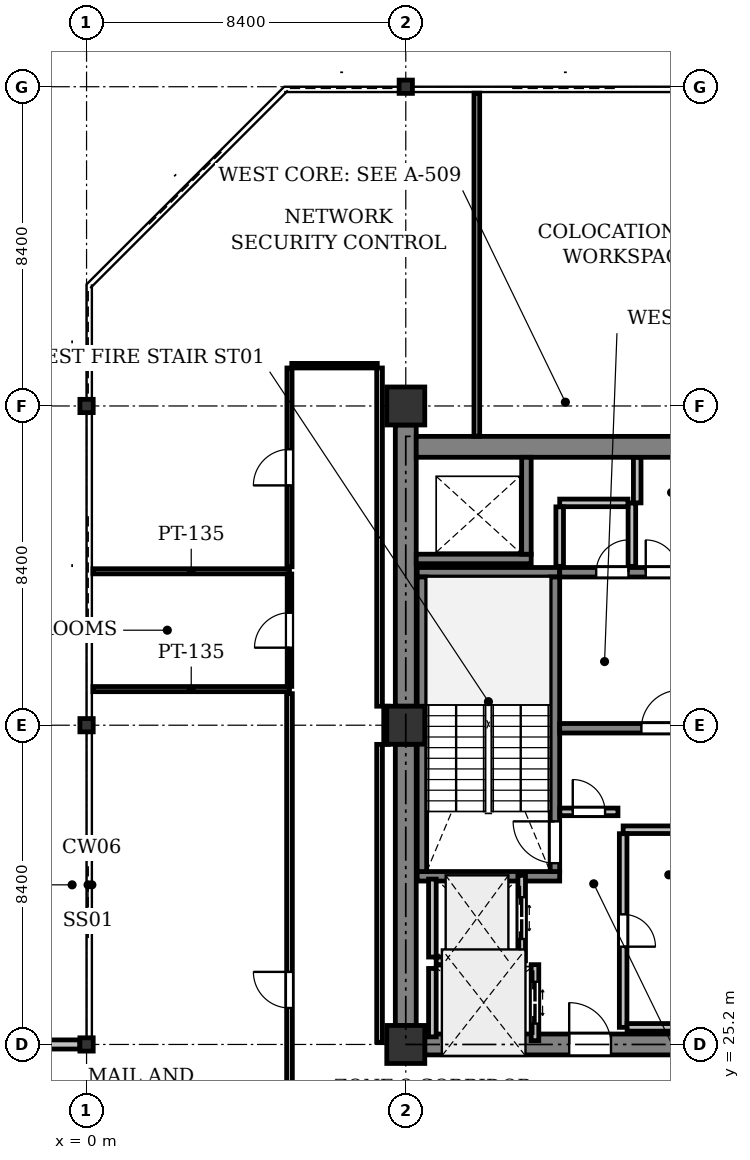
"""IFC4 building model, lengths in metres.
Left out: names, types, materials, properties, quantities, classifications, styles, units other than length and angle.
Written with IfcOpenShell. Run it as: python <this file> out.ifc"""

import sys

from ifc_helpers import new_model, si_unit, direction, frame, frame_2d, origin, origin_2d, place, context, subcontext, project, spatial, rectangle, i_section, extrude, element, fill, save


model = new_model("IFC4")
c1 = context("Model", 3, precision=1e-05, world=origin(), true_north=direction((0.0, 1.0)))
c2 = subcontext(c1, "Body", "Model", "MODEL_VIEW")
j1 = project(units=[si_unit("LENGTHUNIT", "METRE"), si_unit("PLANEANGLEUNIT", "RADIAN")], contexts=[c1])
p1 = place(None, origin())
s1 = spatial("IfcSite", under=j1, at=p1, CompositionType="ELEMENT")
p2 = place(p1, origin())
s2 = spatial("IfcBuilding", under=s1, at=p2, CompositionType="ELEMENT")
p3 = place(p2, frame((0.0, 0.0, 171.4)))
s3 = spatial("IfcBuildingStorey", under=s2, at=p3, CompositionType="ELEMENT", Elevation=171.4)
for number, where, z_axis, x_axis in (
    (1, (0.0, 25.2, 0.0), (0.0, 0.0, 1.0), (1.0, 0.0, 0.0)),
    (2, (0.0, 33.6, 0.0), (0.0, 0.0, 1.0), (1.0, 0.0, 0.0)),
    (3, (0.0, 42.0, 0.0), (0.0, 0.0, 1.0), (1.0, 0.0, 0.0)),
):
    element("IfcColumn", number, at=place(p3, frame(where, z_axis=z_axis, x_axis=x_axis)), inside=s3, PredefinedType="COLUMN", context=c2, shape_type="SweptSolid", body=[
        extrude(i_section(OverallWidth=0.35, OverallDepth=0.35, WebThickness=0.02, FlangeThickness=0.032, at=origin_2d()), origin(), (0.0, 0.0, 1.0), 4.1),
    ])
for number, where, z_axis, x_axis in (
    (4, (8.4, 25.2, 0.0), (0.0, 0.0, 1.0), (1.0, 0.0, 0.0)),
    (5, (8.4, 33.6, 0.0), (0.0, 0.0, 1.0), (1.0, 0.0, 0.0)),
    (6, (8.4, 42.0, 0.0), (0.0, 0.0, 1.0), (1.0, 0.0, 0.0)),
):
    element("IfcColumn", number, at=place(p3, frame(where, z_axis=z_axis, x_axis=x_axis)), inside=s3, PredefinedType="COLUMN", context=c2, shape_type="SweptSolid", body=[
        extrude(rectangle(XDim=1.0, YDim=1.0, at=origin_2d()), origin(), (0.0, 0.0, 1.0), 4.1),
    ])
p4 = place(p3, frame((8.4, 50.4, 0.0), z_axis=(0.0, 0.0, 1.0), x_axis=(1.0, 0.0, 0.0)))
e7 = element("IfcColumn", 7, at=p4, inside=s3, PredefinedType="COLUMN", context=c2, shape_type="SweptSolid", body=[
    extrude(i_section(OverallWidth=0.35, OverallDepth=0.35, WebThickness=0.02, FlangeThickness=0.032, at=origin_2d()), origin(), (0.0, 0.0, 1.0), 4.1),
])
p5 = place(p3, frame((-7.344, 25.2, 0.0), z_axis=(0.0, 0.0, 1.0), x_axis=(1.0, 0.0, 0.0)))
e8 = element("IfcWall", 8, at=p5, inside=s3, PredefinedType="STANDARD", context=c2, shape_type="SweptSolid", body=[
    extrude(rectangle(XDim=7.169, YDim=0.24, at=frame_2d((3.585, 0.0))), origin(), (0.0, 0.0, 1.0), 2.915),
])
p6 = place(p3, frame((8.4, 25.7, 0.0), z_axis=(0.0, 0.0, 1.0), x_axis=(0.0, 1.0, 0.0)))
e9 = element("IfcWall", 9, at=p6, inside=s3, PredefinedType="SHEAR", context=c2, shape_type="SweptSolid", body=[
    extrude(rectangle(XDim=7.4, YDim=0.55, at=frame_2d((3.7, 0.0))), origin(), (0.0, 0.0, 1.0), 3.825),
])
p7 = place(p3, frame((8.4, 34.1, 0.0), z_axis=(0.0, 0.0, 1.0), x_axis=(0.0, 1.0, 0.0)))
e10 = element("IfcWall", 10, at=p7, inside=s3, PredefinedType="SHEAR", context=c2, shape_type="SweptSolid", body=[
    extrude(rectangle(XDim=7.4, YDim=0.55, at=frame_2d((3.7, 0.0))), origin(), (0.0, 0.0, 1.0), 3.825),
])
p8 = place(p3, frame((8.675, 40.925, 0.0), z_axis=(0.0, 0.0, 1.0), x_axis=(1.0, 0.0, 0.0)))
e11 = element("IfcWall", 11, at=p8, inside=s3, PredefinedType="SHEAR", context=c2, shape_type="SweptSolid", body=[
    extrude(rectangle(XDim=7.85, YDim=0.55, at=frame_2d((3.925, 0.0))), origin(), (0.0, 0.0, 1.0), 3.825),
])
p9 = place(p3, frame((8.9, 25.2, 0.0), z_axis=(0.0, 0.0, 1.0), x_axis=(1.0, 0.0, 0.0)))
e12 = element("IfcWall", 12, at=p9, inside=s3, PredefinedType="SHEAR", context=c2, shape_type="SweptSolid", body=[
    extrude(rectangle(XDim=7.4, YDim=0.55, at=frame_2d((3.7, 0.0))), origin(), (0.0, 0.0, 1.0), 3.825),
])
p10 = place(p9, frame((3.8, 0.0, 0.0)))
e13 = element("IfcOpeningElement", 13, at=p10, cuts=e12, PredefinedType="OPENING", context=c2, shape_type="SweptSolid", body=[
    extrude(rectangle(XDim=1.1, YDim=2.15, at=frame_2d((0.55, 1.075))), frame((0.0, 0.285, 0.0), z_axis=(0.0, -1.0, 0.0), x_axis=(1.0, 0.0, 0.0)), (0.0, 0.0, 1.0), 0.57),
])
for number, where, z_axis, x_axis in (
    (14, (12.45, 29.625, 0.0), (0.0, 0.0, 1.0), (-1.0, 0.0, 0.0)),
    (15, (12.45, 37.625, 0.0), (0.0, 0.0, 1.0), (-1.0, 0.0, 0.0)),
):
    element("IfcWall", number, at=place(p3, frame(where, z_axis=z_axis, x_axis=x_axis)), inside=s3, PredefinedType="SHEAR", context=c2, shape_type="SweptSolid", body=[
        extrude(rectangle(XDim=3.75, YDim=0.25, at=frame_2d((1.875, 0.0))), origin(), (0.0, 0.0, 1.0), 3.825),
    ])
p11 = place(p3, frame((12.325, 29.75, 0.0), z_axis=(0.0, 0.0, 1.0), x_axis=(0.0, 1.0, 0.0)))
e16 = element("IfcWall", 16, at=p11, inside=s3, PredefinedType="SHEAR", context=c2, shape_type="SweptSolid", body=[
    extrude(rectangle(XDim=7.75, YDim=0.25, at=frame_2d((3.875, 0.0))), origin(), (0.0, 0.0, 1.0), 3.825),
])
p12 = place(p11, frame((0.22, 0.0, 0.0)))
e17 = element("IfcOpeningElement", 17, at=p12, cuts=e16, PredefinedType="OPENING", context=c2, shape_type="SweptSolid", body=[
    extrude(rectangle(XDim=1.1, YDim=2.15, at=frame_2d((0.55, 1.075))), frame((0.0, 0.135, 0.0), z_axis=(0.0, -1.0, 0.0), x_axis=(1.0, 0.0, 0.0)), (0.0, 0.0, 1.0), 0.27),
])
p13 = place(p3, frame((8.825, 29.75, 0.0), z_axis=(0.0, 0.0, 1.0), x_axis=(0.0, 1.0, 0.0)))
e18 = element("IfcWall", 18, at=p13, inside=s3, PredefinedType="SHEAR", context=c2, shape_type="SweptSolid", body=[
    extrude(rectangle(XDim=7.75, YDim=0.25, at=frame_2d((3.875, 0.0))), origin(), (0.0, 0.0, 1.0), 3.825),
])
p14 = place(p3, frame((8.675, 37.975, 0.0), z_axis=(0.0, 0.0, 1.0), x_axis=(1.0, 0.0, 0.0)))
e19 = element("IfcWall", 19, at=p14, inside=s3, PredefinedType="SHEAR", context=c2, shape_type="SweptSolid", body=[
    extrude(rectangle(XDim=3.025, YDim=0.25, at=frame_2d((1.512, 0.0))), origin(), (0.0, 0.0, 1.0), 3.825),
])
p15 = place(p3, frame((11.575, 38.1, 0.0), z_axis=(0.0, 0.0, 1.0), x_axis=(0.0, 1.0, 0.0)))
e20 = element("IfcWall", 20, at=p15, inside=s3, PredefinedType="SHEAR", context=c2, shape_type="SweptSolid", body=[
    extrude(rectangle(XDim=2.55, YDim=0.25, at=frame_2d((1.275, 0.0))), origin(), (0.0, 0.0, 1.0), 3.825),
])
p16 = place(p3, frame((12.45, 33.52, 0.0), z_axis=(0.0, 0.0, 1.0), x_axis=(1.0, 0.0, 0.0)))
e21 = element("IfcWall", 21, at=p16, inside=s3, PredefinedType="SHEAR", context=c2, shape_type="SweptSolid", body=[
    extrude(rectangle(XDim=3.85, YDim=0.25, at=frame_2d((1.925, 0.0))), origin(), (0.0, 0.0, 1.0), 3.825),
])
p17 = place(p16, frame((2.15, 0.0, 0.0)))
e22 = element("IfcOpeningElement", 22, at=p17, cuts=e21, PredefinedType="OPENING", context=c2, shape_type="SweptSolid", body=[
    extrude(rectangle(XDim=1.0, YDim=2.15, at=frame_2d((0.5, 1.075))), frame((0.0, 0.135, 0.0), z_axis=(0.0, -1.0, 0.0), x_axis=(1.0, 0.0, 0.0)), (0.0, 0.0, 1.0), 0.27),
])
p18 = place(p3, frame((12.45, 37.625, 0.0), z_axis=(0.0, 0.0, 1.0), x_axis=(1.0, 0.0, 0.0)))
e23 = element("IfcWall", 23, at=p18, inside=s3, PredefinedType="SHEAR", context=c2, shape_type="SweptSolid", body=[
    extrude(rectangle(XDim=4.075, YDim=0.25, at=frame_2d((2.038, 0.0))), origin(), (0.0, 0.0, 1.0), 3.825),
])
p19 = place(p18, frame((0.96, 0.0, 0.0)))
e24 = element("IfcOpeningElement", 24, at=p19, cuts=e23, PredefinedType="OPENING", context=c2, shape_type="SweptSolid", body=[
    extrude(rectangle(XDim=0.85, YDim=2.15, at=frame_2d((0.425, 1.075))), frame((0.0, 0.135, 0.0), z_axis=(0.0, -1.0, 0.0), x_axis=(1.0, 0.0, 0.0)), (0.0, 0.0, 1.0), 0.27),
])
p20 = place(p18, frame((2.264, 0.0, 0.0)))
e25 = element("IfcOpeningElement", 25, at=p20, cuts=e23, PredefinedType="OPENING", context=c2, shape_type="SweptSolid", body=[
    extrude(rectangle(XDim=0.85, YDim=2.15, at=frame_2d((0.425, 1.075))), frame((0.0, 0.135, 0.0), z_axis=(0.0, -1.0, 0.0), x_axis=(1.0, 0.0, 0.0)), (0.0, 0.0, 1.0), 0.27),
])
p21 = place(p3, frame((11.45, 27.4, 0.0), z_axis=(0.0, 0.0, 1.0), x_axis=(0.0, 1.0, 0.0)))
e26 = element("IfcWall", 26, at=p21, inside=s3, PredefinedType="PARTITIONING", context=c2, shape_type="SweptSolid", body=[
    extrude(rectangle(XDim=2.25, YDim=0.2, at=frame_2d((1.125, 0.0))), origin(), (0.0, 0.0, 1.0), 3.825),
])
p22 = place(p21, frame((0.575, 0.0, 0.0)))
e27 = element("IfcOpeningElement", 27, at=p22, cuts=e26, PredefinedType="OPENING", context=c2, shape_type="SweptSolid", body=[
    extrude(rectangle(XDim=1.1, YDim=2.2, at=frame_2d((0.55, 1.1))), frame((0.0, 0.11, 0.0), z_axis=(0.0, -1.0, 0.0), x_axis=(1.0, 0.0, 0.0)), (0.0, 0.0, 1.0), 0.22),
])
p23 = place(p3, frame((9.1, 27.5, 0.0), z_axis=(0.0, 0.0, 1.0), x_axis=(0.0, 1.0, 0.0)))
e28 = element("IfcWall", 28, at=p23, inside=s3, PredefinedType="PARTITIONING", context=c2, shape_type="SweptSolid", body=[
    extrude(rectangle(XDim=2.05, YDim=0.2, at=frame_2d((1.025, 0.0))), origin(), (0.0, 0.0, 1.0), 3.825),
])
p24 = place(p3, frame((9.2, 27.4, 0.0), z_axis=(0.0, 0.0, 1.0), x_axis=(1.0, 0.0, 0.0)))
e29 = element("IfcWall", 29, at=p24, inside=s3, PredefinedType="PARTITIONING", context=c2, shape_type="SweptSolid", body=[
    extrude(rectangle(XDim=2.15, YDim=0.2, at=frame_2d((1.075, 0.0))), origin(), (0.0, 0.0, 1.0), 3.825),
])
p25 = place(p3, frame((11.8, 25.3, 0.0), z_axis=(0.0, 0.0, 1.0), x_axis=(0.0, 1.0, 0.0)))
e30 = element("IfcWall", 30, at=p25, inside=s3, PredefinedType="PARTITIONING", context=c2, shape_type="SweptSolid", body=[
    extrude(rectangle(XDim=2.0, YDim=0.2, at=frame_2d((1.0, 0.0))), origin(), (0.0, 0.0, 1.0), 3.825),
])
p26 = place(p25, frame((0.45, 0.0, 0.0)))
e31 = element("IfcOpeningElement", 31, at=p26, cuts=e30, PredefinedType="OPENING", context=c2, shape_type="SweptSolid", body=[
    extrude(rectangle(XDim=1.1, YDim=2.2, at=frame_2d((0.55, 1.1))), frame((0.0, 0.11, 0.0), z_axis=(0.0, -1.0, 0.0), x_axis=(1.0, 0.0, 0.0)), (0.0, 0.0, 1.0), 0.22),
])
p27 = place(p3, frame((9.1, 25.4, 0.0), z_axis=(0.0, 0.0, 1.0), x_axis=(0.0, 1.0, 0.0)))
e32 = element("IfcWall", 32, at=p27, inside=s3, PredefinedType="PARTITIONING", context=c2, shape_type="SweptSolid", body=[
    extrude(rectangle(XDim=1.8, YDim=0.2, at=frame_2d((0.9, 0.0))), origin(), (0.0, 0.0, 1.0), 3.825),
])
p28 = place(p3, frame((16.346, 30.85, 0.0), z_axis=(0.0, 0.0, 1.0), x_axis=(-1.0, 0.0, 0.0)))
e33 = element("IfcWall", 33, at=p28, inside=s3, PredefinedType="PARTITIONING", context=c2, shape_type="SweptSolid", body=[
    extrude(rectangle(XDim=2.226, YDim=0.2, at=frame_2d((1.113, 0.0))), origin(), (0.0, 0.0, 1.0), 3.825),
])
p29 = place(p3, frame((14.12, 30.746, 0.0), z_axis=(0.0, 0.0, 1.0), x_axis=(0.0, -1.0, 0.0)))
e34 = element("IfcWall", 34, at=p29, inside=s3, PredefinedType="PARTITIONING", context=c2, shape_type="SweptSolid", body=[
    extrude(rectangle(XDim=5.096, YDim=0.2, at=frame_2d((2.548, 0.0))), origin(), (0.0, 0.0, 1.0), 3.825),
])
p30 = place(p29, frame((2.123, 0.0, 0.0)))
e35 = element("IfcOpeningElement", 35, at=p30, cuts=e34, PredefinedType="OPENING", context=c2, shape_type="SweptSolid", body=[
    extrude(rectangle(XDim=0.85, YDim=2.15, at=frame_2d((0.425, 1.075))), frame((0.0, 0.11, 0.0), z_axis=(0.0, -1.0, 0.0), x_axis=(1.0, 0.0, 0.0)), (0.0, 0.0, 1.0), 0.22),
])
p31 = place(p3, frame((14.224, 25.65, 0.0), z_axis=(0.0, 0.0, 1.0), x_axis=(1.0, 0.0, 0.0)))
e36 = element("IfcWall", 36, at=p31, inside=s3, PredefinedType="PARTITIONING", context=c2, shape_type="SweptSolid", body=[
    extrude(rectangle(XDim=2.071, YDim=0.2, at=frame_2d((1.035, 0.0))), origin(), (0.0, 0.0, 1.0), 3.825),
])
p32 = place(p3, frame((12.454, 31.32, 0.0), z_axis=(0.0, 0.0, 1.0), x_axis=(0.999999949061, -0.000319182876, 0.0)))
e37 = element("IfcWall", 37, at=p32, inside=s3, PredefinedType="PARTITIONING", context=c2, shape_type="SweptSolid", body=[
    extrude(rectangle(XDim=1.53, YDim=0.2, at=frame_2d((0.765, 0.0))), origin(), (0.0, 0.0, 1.0), 3.825),
])
p33 = place(p32, frame((0.34, 0.0, 0.0)))
e38 = element("IfcOpeningElement", 38, at=p33, cuts=e37, PredefinedType="OPENING", context=c2, shape_type="SweptSolid", body=[
    extrude(rectangle(XDim=0.85, YDim=2.15, at=frame_2d((0.425, 1.075))), frame((0.0, 0.11, 0.0), z_axis=(0.0, -1.0, 0.0), x_axis=(1.0, 0.0, 0.0)), (0.0, 0.0, 1.0), 0.22),
])
p34 = place(p3, frame((14.35, 37.78, 0.0), z_axis=(0.0, 0.0, 1.0), x_axis=(0.0, 1.0, 0.0)))
e39 = element("IfcWall", 39, at=p34, inside=s3, PredefinedType="PARTITIONING", context=c2, shape_type="SweptSolid", body=[
    extrude(rectangle(XDim=1.67, YDim=0.2, at=frame_2d((0.835, 0.0))), origin(), (0.0, 0.0, 1.0), 2.875),
])
p35 = place(p3, frame((14.246, 39.45, 0.0), z_axis=(0.0, 0.0, 1.0), x_axis=(-1.0, 0.0, 0.0)))
e40 = element("IfcWall", 40, at=p35, inside=s3, PredefinedType="PARTITIONING", context=c2, shape_type="SweptSolid", body=[
    extrude(rectangle(XDim=1.796, YDim=0.2, at=frame_2d((0.898, 0.0))), origin(), (0.0, 0.0, 1.0), 2.875),
])
p36 = place(p3, frame((12.45, 39.346, 0.0), z_axis=(0.0, 0.0, 1.0), x_axis=(0.0, -1.0, 0.0)))
e41 = element("IfcWall", 41, at=p36, inside=s3, PredefinedType="PARTITIONING", context=c2, shape_type="SweptSolid", body=[
    extrude(rectangle(XDim=1.566, YDim=0.2, at=frame_2d((0.783, 0.0))), origin(), (0.0, 0.0, 1.0), 2.875),
])
p37 = place(p3, frame((14.49, 40.646, 0.0), z_axis=(0.0, 0.0, 1.0), x_axis=(0.0, -1.0, 0.0)))
e42 = element("IfcWall", 42, at=p37, inside=s3, PredefinedType="PARTITIONING", context=c2, shape_type="SweptSolid", body=[
    extrude(rectangle(XDim=1.196, YDim=0.2, at=frame_2d((0.598, 0.0))), origin(), (0.0, 0.0, 1.0), 2.875),
])
for number, where, z_axis, x_axis in (
    (43, (5.34, 37.65, 0.0), (0.0, 0.0, 1.0), (-1.0, 0.0, 0.0)),
    (44, (0.169, 34.55, 0.0), (0.0, 0.0, 1.0), (1.0, 0.0, 0.0)),
):
    element("IfcWall", number, at=place(p3, frame(where, z_axis=z_axis, x_axis=x_axis)), inside=s3, PredefinedType="PARTITIONING", context=c2, shape_type="SweptSolid", body=[
        extrude(rectangle(XDim=5.171, YDim=0.135, at=frame_2d((2.585, 0.0))), origin(), (0.0, 0.0, 1.0), 3.518),
    ])
p38 = place(p3, frame((5.34, 34.622, 0.0), z_axis=(0.0, 0.0, 1.0), x_axis=(0.0, 1.0, 0.0)))
e45 = element("IfcWall", 45, at=p38, inside=s3, PredefinedType="PARTITIONING", context=c2, shape_type="SweptSolid", body=[
    extrude(rectangle(XDim=2.957, YDim=0.12, at=frame_2d((1.479, 0.0))), origin(), (0.0, 0.0, 1.0), 3.825),
])
p39 = place(p38, frame((1.019, 0.0, 0.0)))
e46 = element("IfcOpeningElement", 46, at=p39, cuts=e45, PredefinedType="OPENING", context=c2, shape_type="SweptSolid", body=[
    extrude(rectangle(XDim=0.92, YDim=2.1, at=frame_2d((0.46, 1.05))), frame((0.0, 0.07, 0.0), z_axis=(0.0, -1.0, 0.0), x_axis=(1.0, 0.0, 0.0)), (0.0, 0.0, 1.0), 0.14),
])
p40 = place(p3, frame((7.88, 33.096, 0.0), z_axis=(0.0, 0.0, 1.0), x_axis=(-0.000486381265, 0.999999881717, 0.0)))
e47 = element("IfcWall", 47, at=p40, inside=s3, PredefinedType="PARTITIONING", context=c2, shape_type="SweptSolid", body=[
    extrude(rectangle(XDim=1.004, YDim=0.12, at=frame_2d((0.502, 0.0))), origin(), (0.0, 0.0, 1.0), 3.365),
])
p41 = place(p3, frame((10.27, 41.204, 0.0), z_axis=(0.0, 0.0, 1.0), x_axis=(0.0, 1.0, 0.0)))
e48 = element("IfcWall", 48, at=p41, inside=s3, PredefinedType="PARTITIONING", context=c2, shape_type="SweptSolid", body=[
    extrude(rectangle(XDim=9.027, YDim=0.15, at=frame_2d((4.513, 0.0))), origin(), (0.0, 0.0, 1.0), 3.365),
])
p42 = place(p3, frame((5.34, 37.77, 0.0), z_axis=(0.0, 0.0, 1.0), x_axis=(0.0, 1.0, 0.0)))
e49 = element("IfcWall", 49, at=p42, inside=s3, PredefinedType="PARTITIONING", context=c2, shape_type="SweptSolid", body=[
    extrude(rectangle(XDim=5.23, YDim=0.135, at=frame_2d((2.615, 0.0))), origin(), (0.0, 0.0, 1.0), 3.365),
])
p43 = place(p42, frame((2.14, 0.0, 0.0)))
e50 = element("IfcOpeningElement", 50, at=p43, cuts=e49, PredefinedType="OPENING", context=c2, shape_type="SweptSolid", body=[
    extrude(rectangle(XDim=0.95, YDim=2.15, at=frame_2d((0.475, 1.075))), frame((0.0, 0.077, 0.0), z_axis=(0.0, -1.0, 0.0), x_axis=(1.0, 0.0, 0.0)), (0.0, 0.0, 1.0), 0.155),
])
p44 = place(p3, frame((5.4, 43.06, 0.0), z_axis=(0.0, 0.0, 1.0), x_axis=(1.0, 0.0, 0.0)))
e51 = element("IfcWall", 51, at=p44, inside=s3, PredefinedType="PARTITIONING", context=c2, shape_type="SweptSolid", body=[
    extrude(rectangle(XDim=2.25, YDim=0.12, at=frame_2d((1.125, 0.0))), origin(), (0.0, 0.0, 1.0), 3.825),
])
p45 = place(p3, frame((7.71, 43.0, 0.0), z_axis=(0.0, 0.0, 1.0), x_axis=(0.0, -1.0, 0.0)))
e52 = element("IfcWall", 52, at=p45, inside=s3, PredefinedType="PARTITIONING", context=c2, shape_type="SweptSolid", body=[
    extrude(rectangle(XDim=8.9, YDim=0.15, at=frame_2d((4.45, 0.0))), origin(), (0.0, 0.0, 1.0), 3.365),
])
p46 = place(p3, frame((7.71, 33.096, 0.0), z_axis=(0.0, 0.0, 1.0), x_axis=(0.0, -1.0, 0.0)))
e53 = element("IfcWall", 53, at=p46, inside=s3, PredefinedType="PARTITIONING", context=c2, shape_type="SweptSolid", body=[
    extrude(rectangle(XDim=7.836, YDim=0.15, at=frame_2d((3.918, 0.0))), origin(), (0.0, 0.0, 1.0), 3.213),
])
p47 = place(p3, frame((5.34, 18.839, 0.0), z_axis=(0.0, 0.0, 1.0), x_axis=(0.0, 1.0, 0.0)))
e54 = element("IfcWall", 54, at=p47, inside=s3, PredefinedType="PARTITIONING", context=c2, shape_type="SweptSolid", body=[
    extrude(rectangle(XDim=15.591, YDim=0.15, at=frame_2d((7.795, 0.0))), origin(), (0.0, 0.0, 1.0), 3.213),
])
p48 = place(p47, frame((7.321, 0.0, 0.0)))
e55 = element("IfcOpeningElement", 55, at=p48, cuts=e54, PredefinedType="OPENING", context=c2, shape_type="SweptSolid", body=[
    extrude(rectangle(XDim=0.95, YDim=2.15, at=frame_2d((0.475, 1.075))), frame((0.0, 0.085, 0.0), z_axis=(0.0, -1.0, 0.0), x_axis=(1.0, 0.0, 0.0)), (0.0, 0.0, 1.0), 0.17),
])
p49 = place(p10, origin())
e56 = element("IfcDoor", 56, at=p49, inside=s3, OperationType="SINGLE_SWING_LEFT", PredefinedType="DOOR", context=c2, shape_type="SweptSolid", body=[
    extrude(rectangle(XDim=1.1, YDim=2.15, at=frame_2d((0.55, 1.075))), frame((0.0, 0.025, 0.0), z_axis=(0.0, -1.0, 0.0), x_axis=(1.0, 0.0, 0.0)), (0.0, 0.0, 1.0), 0.05),
])
fill(e13, e56)
p50 = place(p12, origin())
e57 = element("IfcDoor", 57, at=p50, inside=s3, OperationType="SINGLE_SWING_RIGHT", PredefinedType="DOOR", context=c2, shape_type="SweptSolid", body=[
    extrude(rectangle(XDim=1.1, YDim=2.15, at=frame_2d((0.55, 1.075))), frame((0.0, 0.025, 0.0), z_axis=(0.0, -1.0, 0.0), x_axis=(1.0, 0.0, 0.0)), (0.0, 0.0, 1.0), 0.05),
])
fill(e17, e57)
p51 = place(p17, origin())
e58 = element("IfcDoor", 58, at=p51, inside=s3, OperationType="SINGLE_SWING_RIGHT", PredefinedType="DOOR", context=c2, shape_type="SweptSolid", body=[
    extrude(rectangle(XDim=1.0, YDim=2.15, at=frame_2d((0.5, 1.075))), frame((0.0, 0.025, 0.0), z_axis=(0.0, -1.0, 0.0), x_axis=(1.0, 0.0, 0.0)), (0.0, 0.0, 1.0), 0.05),
])
fill(e22, e58)
p52 = place(p22, origin())
e59 = element("IfcDoor", 59, at=p52, inside=s3, OperationType="DOUBLE_DOOR_SLIDING", PredefinedType="DOOR", context=c2, shape_type="SweptSolid", body=[
    extrude(rectangle(XDim=1.1, YDim=2.2, at=frame_2d((0.55, 1.1))), frame((0.0, 0.025, 0.0), z_axis=(0.0, -1.0, 0.0), x_axis=(1.0, 0.0, 0.0)), (0.0, 0.0, 1.0), 0.05),
])
fill(e27, e59)
p53 = place(p26, origin())
e60 = element("IfcDoor", 60, at=p53, inside=s3, OperationType="DOUBLE_DOOR_SLIDING", PredefinedType="DOOR", context=c2, shape_type="SweptSolid", body=[
    extrude(rectangle(XDim=1.1, YDim=2.2, at=frame_2d((0.55, 1.1))), frame((0.0, 0.025, 0.0), z_axis=(0.0, -1.0, 0.0), x_axis=(1.0, 0.0, 0.0)), (0.0, 0.0, 1.0), 0.05),
])
fill(e31, e60)
p54 = place(p30, origin())
e61 = element("IfcDoor", 61, at=p54, inside=s3, OperationType="SINGLE_SWING_RIGHT", PredefinedType="DOOR", context=c2, shape_type="SweptSolid", body=[
    extrude(rectangle(XDim=0.85, YDim=2.15, at=frame_2d((0.425, 1.075))), frame((0.0, 0.025, 0.0), z_axis=(0.0, -1.0, 0.0), x_axis=(1.0, 0.0, 0.0)), (0.0, 0.0, 1.0), 0.05),
])
fill(e35, e61)
p55 = place(p33, origin())
e62 = element("IfcDoor", 62, at=p55, inside=s3, OperationType="SINGLE_SWING_LEFT", PredefinedType="DOOR", context=c2, shape_type="SweptSolid", body=[
    extrude(rectangle(XDim=0.85, YDim=2.15, at=frame_2d((0.425, 1.075))), frame((0.0, 0.025, 0.0), z_axis=(0.0, -1.0, 0.0), x_axis=(1.0, 0.0, 0.0)), (0.0, 0.0, 1.0), 0.05),
])
fill(e38, e62)
p56 = place(p19, origin())
e63 = element("IfcDoor", 63, at=p56, inside=s3, OperationType="SINGLE_SWING_RIGHT", PredefinedType="DOOR", context=c2, shape_type="SweptSolid", body=[
    extrude(rectangle(XDim=0.85, YDim=2.15, at=frame_2d((0.425, 1.075))), frame((0.0, 0.025, 0.0), z_axis=(0.0, -1.0, 0.0), x_axis=(1.0, 0.0, 0.0)), (0.0, 0.0, 1.0), 0.05),
])
fill(e24, e63)
p57 = place(p20, origin())
e64 = element("IfcDoor", 64, at=p57, inside=s3, OperationType="SINGLE_SWING_LEFT", PredefinedType="DOOR", context=c2, shape_type="SweptSolid", body=[
    extrude(rectangle(XDim=0.85, YDim=2.15, at=frame_2d((0.425, 1.075))), frame((0.0, 0.025, 0.0), z_axis=(0.0, -1.0, 0.0), x_axis=(1.0, 0.0, 0.0)), (0.0, 0.0, 1.0), 0.05),
])
fill(e25, e64)
p58 = place(p39, origin())
e65 = element("IfcDoor", 65, at=p58, inside=s3, OperationType="SINGLE_SWING_LEFT", PredefinedType="DOOR", context=c2, shape_type="SweptSolid", body=[
    extrude(rectangle(XDim=0.92, YDim=2.1, at=frame_2d((0.46, 1.05))), frame((0.0, 0.025, 0.0), z_axis=(0.0, -1.0, 0.0), x_axis=(1.0, 0.0, 0.0)), (0.0, 0.0, 1.0), 0.05),
])
fill(e46, e65)
p59 = place(p43, origin())
e66 = element("IfcDoor", 66, at=p59, inside=s3, OperationType="SINGLE_SWING_LEFT", PredefinedType="DOOR", context=c2, shape_type="SweptSolid", body=[
    extrude(rectangle(XDim=0.95, YDim=2.15, at=frame_2d((0.475, 1.075))), frame((0.0, 0.025, 0.0), z_axis=(0.0, -1.0, 0.0), x_axis=(1.0, 0.0, 0.0)), (0.0, 0.0, 1.0), 0.05),
])
fill(e50, e66)
p60 = place(p48, origin())
e67 = element("IfcDoor", 67, at=p60, inside=s3, OperationType="SINGLE_SWING_RIGHT", PredefinedType="DOOR", context=c2, shape_type="SweptSolid", body=[
    extrude(rectangle(XDim=0.95, YDim=2.15, at=frame_2d((0.475, 1.075))), frame((0.0, 0.025, 0.0), z_axis=(0.0, -1.0, 0.0), x_axis=(1.0, 0.0, 0.0)), (0.0, 0.0, 1.0), 0.05),
])
fill(e55, e67)
save(model, sys.argv[1])
